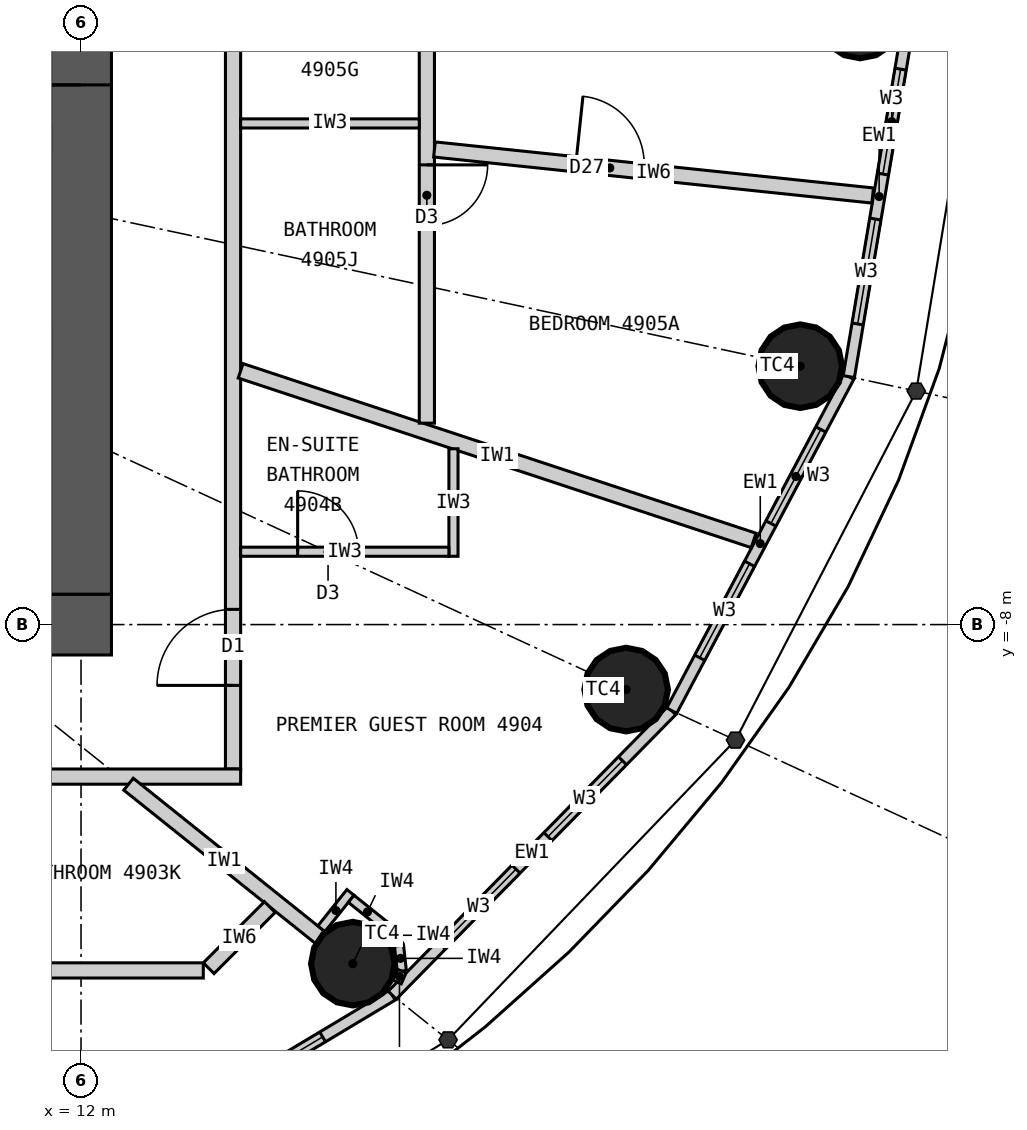
"""IFC4 building model, lengths in metres.
Left out: names, types, materials, properties, quantities, classifications, styles, units other than length and angle.
Written with IfcOpenShell. Run it as: python <this file> out.ifc"""

import sys

from ifc_helpers import new_model, si_unit, direction, frame, frame_2d, origin, origin_2d, place, context, subcontext, project, spatial, rectangle, circle, extrude, clip, halfspace, element, fill, save


model = new_model("IFC4")
c1 = context("Model", 3, precision=1e-05, world=origin(), true_north=direction((0.0, 1.0)))
c2 = subcontext(c1, "Body", "Model", "MODEL_VIEW")
j1 = project(units=[si_unit("LENGTHUNIT", "METRE"), si_unit("PLANEANGLEUNIT", "RADIAN")], contexts=[c1])
p1 = place(None, origin())
s1 = spatial("IfcSite", under=j1, at=p1, CompositionType="ELEMENT")
p2 = place(p1, origin())
s2 = spatial("IfcBuilding", under=s1, at=p2, CompositionType="ELEMENT")
p3 = place(p2, frame((0.0, 0.0, 183.0)))
s3 = spatial("IfcBuildingStorey", under=s2, at=p3, CompositionType="ELEMENT", Elevation=183.0)
for number, where, z_axis, x_axis in (
    (1, (22.25, 0.0, 0.0), (0.0, 0.0, 1.0), (1.0, 0.0, 0.0)),
    (2, (15.576, -12.461, 0.0), (0.0, 0.0, 1.0), (1.0, 0.0, 0.0)),
    (3, (19.172, -8.855, 0.0), (0.0, 0.0, 1.0), (1.0, 0.0, 0.0)),
    (4, (21.463, -4.601, 0.0), (0.0, 0.0, 1.0), (1.0, 0.0, 0.0)),
):
    element("IfcColumn", number, at=place(p3, frame(where, z_axis=z_axis, x_axis=x_axis)), inside=s3, PredefinedType="COLUMN", context=c2, shape_type="Clipping", body=[
        clip(extrude(circle(Radius=0.55, at=origin_2d()), origin(), (0.0, 0.0, 1.0), 3.3), halfspace(frame((0.0, 0.0, 2.25), z_axis=(0.0, 0.0, 1.0), x_axis=(1.0, 0.0, 0.0)), False)),
    ])
p4 = place(p3, frame((12.4, -8.0, 0.0), z_axis=(0.0, 0.0, 1.0), x_axis=(-1.0, 0.0, 0.0)))
e5 = element("IfcWall", 5, at=p4, inside=s3, PredefinedType="SHEAR", context=c2, shape_type="SweptSolid", body=[
    extrude(rectangle(XDim=24.8, YDim=0.8, at=frame_2d((12.4, 0.0))), origin(), (0.0, 0.0, 1.0), 3.3),
])
p5 = place(p4, frame((11.1, 0.0, 0.0)))
e6 = element("IfcOpeningElement", 6, at=p5, cuts=e5, PredefinedType="OPENING", context=c2, shape_type="SweptSolid", body=[
    extrude(rectangle(XDim=1.2, YDim=2.2, at=frame_2d((0.6, 1.1))), frame((0.0, 0.41, 0.0), z_axis=(0.0, -1.0, 0.0), x_axis=(1.0, 0.0, 0.0)), (0.0, 0.0, 1.0), 0.82),
])
p6 = place(p4, frame((18.7, 0.0, 0.0)))
e7 = element("IfcOpeningElement", 7, at=p6, cuts=e5, PredefinedType="OPENING", context=c2, shape_type="SweptSolid", body=[
    extrude(rectangle(XDim=0.9, YDim=2.2, at=frame_2d((0.45, 1.1))), frame((0.0, 0.41, 0.0), z_axis=(0.0, -1.0, 0.0), x_axis=(1.0, 0.0, 0.0)), (0.0, 0.0, 1.0), 0.82),
])
p7 = place(p3, frame((12.0, -7.6, 0.0), z_axis=(0.0, 0.0, 1.0), x_axis=(0.0, 1.0, 0.0)))
e8 = element("IfcWall", 8, at=p7, inside=s3, PredefinedType="SHEAR", context=c2, shape_type="SweptSolid", body=[
    extrude(rectangle(XDim=15.2, YDim=0.8, at=frame_2d((7.6, 0.0))), origin(), (0.0, 0.0, 1.0), 3.3),
])
p8 = place(p7, frame((6.7, 0.0, 0.0)))
e9 = element("IfcOpeningElement", 9, at=p8, cuts=e8, PredefinedType="OPENING", context=c2, shape_type="SweptSolid", body=[
    extrude(rectangle(XDim=1.8, YDim=2.2, at=frame_2d((0.9, 1.1))), frame((0.0, 0.41, 0.0), z_axis=(0.0, -1.0, 0.0), x_axis=(1.0, 0.0, 0.0)), (0.0, 0.0, 1.0), 0.82),
])
p9 = place(p3, frame((11.346, -15.722, 0.0), z_axis=(0.0, 0.0, 1.0), x_axis=(0.857695199231, 0.514158482587, 0.0)))
e10 = element("IfcWall", 10, at=p9, inside=s3, PredefinedType="ELEMENTEDWALL", context=c2, shape_type="SweptSolid", body=[
    extrude(rectangle(XDim=5.536, YDim=0.15, at=frame_2d((2.768, 0.0))), origin(), (0.0, 0.0, 1.0), 3.05),
])
p10 = place(p9, frame((1.068, 0.0, 0.9)))
e11 = element("IfcOpeningElement", 11, at=p10, cuts=e10, PredefinedType="OPENING", context=c2, shape_type="SweptSolid", body=[
    extrude(rectangle(XDim=1.4, YDim=1.9, at=frame_2d((0.7, 0.95))), frame((0.0, 0.085, 0.0), z_axis=(0.0, -1.0, 0.0), x_axis=(1.0, 0.0, 0.0)), (0.0, 0.0, 1.0), 0.17),
])
p11 = place(p9, frame((3.068, 0.0, 0.9)))
e12 = element("IfcOpeningElement", 12, at=p11, cuts=e10, PredefinedType="OPENING", context=c2, shape_type="SweptSolid", body=[
    extrude(rectangle(XDim=1.4, YDim=1.9, at=frame_2d((0.7, 0.95))), frame((0.0, 0.085, 0.0), z_axis=(0.0, -1.0, 0.0), x_axis=(1.0, 0.0, 0.0)), (0.0, 0.0, 1.0), 0.17),
])
p12 = place(p3, frame((16.095, -12.876, 0.0), z_axis=(0.0, 0.0, 1.0), x_axis=(0.700727467776, 0.71342905457, 0.0)))
e13 = element("IfcWall", 13, at=p12, inside=s3, PredefinedType="ELEMENTEDWALL", context=c2, shape_type="SweptSolid", body=[
    extrude(rectangle(XDim=5.247, YDim=0.15, at=frame_2d((2.624, 0.0))), origin(), (0.0, 0.0, 1.0), 3.05),
])
p13 = place(p12, frame((0.924, 0.0, 0.9)))
e14 = element("IfcOpeningElement", 14, at=p13, cuts=e13, PredefinedType="OPENING", context=c2, shape_type="SweptSolid", body=[
    extrude(rectangle(XDim=1.4, YDim=1.9, at=frame_2d((0.7, 0.95))), frame((0.0, 0.085, 0.0), z_axis=(0.0, -1.0, 0.0), x_axis=(1.0, 0.0, 0.0)), (0.0, 0.0, 1.0), 0.17),
])
p14 = place(p12, frame((2.924, 0.0, 0.9)))
e15 = element("IfcOpeningElement", 15, at=p14, cuts=e13, PredefinedType="OPENING", context=c2, shape_type="SweptSolid", body=[
    extrude(rectangle(XDim=1.4, YDim=1.9, at=frame_2d((0.7, 0.95))), frame((0.0, 0.085, 0.0), z_axis=(0.0, -1.0, 0.0), x_axis=(1.0, 0.0, 0.0)), (0.0, 0.0, 1.0), 0.17),
])
p15 = place(p3, frame((19.772, -9.132, 0.0), z_axis=(0.0, 0.0, 1.0), x_axis=(0.468428906714, 0.883501193748, 0.0)))
e16 = element("IfcWall", 16, at=p15, inside=s3, PredefinedType="ELEMENTEDWALL", context=c2, shape_type="SweptSolid", body=[
    extrude(rectangle(XDim=4.974, YDim=0.15, at=frame_2d((2.487, 0.0))), origin(), (0.0, 0.0, 1.0), 3.05),
])
p16 = place(p15, frame((0.787, 0.0, 0.9)))
e17 = element("IfcOpeningElement", 17, at=p16, cuts=e16, PredefinedType="OPENING", context=c2, shape_type="SweptSolid", body=[
    extrude(rectangle(XDim=1.4, YDim=1.9, at=frame_2d((0.7, 0.95))), frame((0.0, 0.085, 0.0), z_axis=(0.0, -1.0, 0.0), x_axis=(1.0, 0.0, 0.0)), (0.0, 0.0, 1.0), 0.17),
])
p17 = place(p15, frame((2.787, 0.0, 0.9)))
e18 = element("IfcOpeningElement", 18, at=p17, cuts=e16, PredefinedType="OPENING", context=c2, shape_type="SweptSolid", body=[
    extrude(rectangle(XDim=1.4, YDim=1.9, at=frame_2d((0.7, 0.95))), frame((0.0, 0.085, 0.0), z_axis=(0.0, -1.0, 0.0), x_axis=(1.0, 0.0, 0.0)), (0.0, 0.0, 1.0), 0.17),
])
p18 = place(p3, frame((22.102, -4.738, 0.0), z_axis=(0.0, 0.0, 1.0), x_axis=(0.166162111254, 0.986098449843, 0.0)))
e19 = element("IfcWall", 19, at=p18, inside=s3, PredefinedType="ELEMENTEDWALL", context=c2, shape_type="SweptSolid", body=[
    extrude(rectangle(XDim=4.805, YDim=0.15, at=frame_2d((2.402, 0.0))), origin(), (0.0, 0.0, 1.0), 3.05),
])
p19 = place(p18, frame((0.702, 0.0, 0.9)))
e20 = element("IfcOpeningElement", 20, at=p19, cuts=e19, PredefinedType="OPENING", context=c2, shape_type="SweptSolid", body=[
    extrude(rectangle(XDim=1.4, YDim=1.9, at=frame_2d((0.7, 0.95))), frame((0.0, 0.085, 0.0), z_axis=(0.0, -1.0, 0.0), x_axis=(1.0, 0.0, 0.0)), (0.0, 0.0, 1.0), 0.17),
])
p20 = place(p18, frame((2.702, 0.0, 0.9)))
e21 = element("IfcOpeningElement", 21, at=p20, cuts=e19, PredefinedType="OPENING", context=c2, shape_type="SweptSolid", body=[
    extrude(rectangle(XDim=1.4, YDim=1.9, at=frame_2d((0.7, 0.95))), frame((0.0, 0.085, 0.0), z_axis=(0.0, -1.0, 0.0), x_axis=(1.0, 0.0, 0.0)), (0.0, 0.0, 1.0), 0.17),
])
p21 = place(p3, frame((14.0, -9.9, 0.0), z_axis=(0.0, 0.0, 1.0), x_axis=(0.0, 1.0, 0.0)))
e22 = element("IfcWall", 22, at=p21, inside=s3, PredefinedType="PARTITIONING", context=c2, shape_type="SweptSolid", body=[
    extrude(rectangle(XDim=19.8, YDim=0.2, at=frame_2d((9.9, 0.0))), origin(), (0.0, 0.0, 1.0), 3.05),
])
p22 = place(p21, frame((1.1, 0.0, 0.0)))
e23 = element("IfcOpeningElement", 23, at=p22, cuts=e22, PredefinedType="OPENING", context=c2, shape_type="SweptSolid", body=[
    extrude(rectangle(XDim=1.0, YDim=2.2, at=frame_2d((0.5, 1.1))), frame((0.0, 0.11, 0.0), z_axis=(0.0, -1.0, 0.0), x_axis=(1.0, 0.0, 0.0)), (0.0, 0.0, 1.0), 0.22),
])
p23 = place(p21, frame((10.832, 0.0, 0.0)))
e24 = element("IfcOpeningElement", 24, at=p23, cuts=e22, PredefinedType="OPENING", context=c2, shape_type="SweptSolid", body=[
    extrude(rectangle(XDim=1.0, YDim=2.2, at=frame_2d((0.5, 1.1))), frame((0.0, 0.11, 0.0), z_axis=(0.0, -1.0, 0.0), x_axis=(1.0, 0.0, 0.0)), (0.0, 0.0, 1.0), 0.22),
])
p24 = place(p3, frame((14.1, -10.0, 0.0), z_axis=(0.0, 0.0, 1.0), x_axis=(-1.0, 0.0, 0.0)))
e25 = element("IfcWall", 25, at=p24, inside=s3, PredefinedType="PARTITIONING", context=c2, shape_type="SweptSolid", body=[
    extrude(rectangle(XDim=28.2, YDim=0.2, at=frame_2d((14.1, 0.0))), origin(), (0.0, 0.0, 1.0), 3.05),
])
p25 = place(p24, frame((23.165, 0.0, 0.0)))
e26 = element("IfcOpeningElement", 26, at=p25, cuts=e25, PredefinedType="OPENING", context=c2, shape_type="SweptSolid", body=[
    extrude(rectangle(XDim=1.0, YDim=2.2, at=frame_2d((0.5, 1.1))), frame((0.0, 0.11, 0.0), z_axis=(0.0, -1.0, 0.0), x_axis=(1.0, 0.0, 0.0)), (0.0, 0.0, 1.0), 0.22),
])
p26 = place(p24, frame((9.94, 0.0, 0.0)))
e27 = element("IfcOpeningElement", 27, at=p26, cuts=e25, PredefinedType="OPENING", context=c2, shape_type="SweptSolid", body=[
    extrude(rectangle(XDim=1.0, YDim=2.2, at=frame_2d((0.5, 1.1))), frame((0.0, 0.11, 0.0), z_axis=(0.0, -1.0, 0.0), x_axis=(1.0, 0.0, 0.0)), (0.0, 0.0, 1.0), 0.22),
])
p27 = place(p3, frame((12.625, -10.1, 0.0), z_axis=(0.0, 0.0, 1.0), x_axis=(0.780876185034, -0.624685827954, 0.0)))
e28 = element("IfcWall", 28, at=p27, inside=s3, PredefinedType="PARTITIONING", context=c2, shape_type="SweptSolid", body=[
    extrude(rectangle(XDim=3.229, YDim=0.2, at=frame_2d((1.615, 0.0))), origin(), (0.0, 0.0, 1.0), 2.25),
])
p28 = place(p3, frame((14.1, -4.661, 0.0), z_axis=(0.0, 0.0, 1.0), x_axis=(0.949453216399, -0.313908569285, 0.0)))
e29 = element("IfcWall", 29, at=p28, inside=s3, PredefinedType="PARTITIONING", context=c2, shape_type="SweptSolid", body=[
    extrude(rectangle(XDim=7.109, YDim=0.2, at=frame_2d((3.554, 0.0))), origin(), (0.0, 0.0, 1.0), 3.05),
])
p29 = place(p3, frame((-4.082, -12.55, 0.0), z_axis=(0.0, 0.0, 1.0), x_axis=(1.0, 0.0, 0.0)))
e30 = element("IfcWall", 30, at=p29, inside=s3, PredefinedType="PARTITIONING", context=c2, shape_type="SweptSolid", body=[
    extrude(rectangle(XDim=17.691, YDim=0.2, at=frame_2d((8.845, 0.0))), origin(), (0.0, 0.0, 1.0), 3.05),
])
p30 = place(p29, frame((2.449, 0.0, 0.0)))
e31 = element("IfcOpeningElement", 31, at=p30, cuts=e30, PredefinedType="OPENING", context=c2, shape_type="SweptSolid", body=[
    extrude(rectangle(XDim=0.8, YDim=2.1, at=frame_2d((0.4, 1.05))), frame((0.0, 0.11, 0.0), z_axis=(0.0, -1.0, 0.0), x_axis=(1.0, 0.0, 0.0)), (0.0, 0.0, 1.0), 0.22),
])
p31 = place(p29, frame((13.97, 0.0, 0.0)))
e32 = element("IfcOpeningElement", 32, at=p31, cuts=e30, PredefinedType="OPENING", context=c2, shape_type="SweptSolid", body=[
    extrude(rectangle(XDim=0.8, YDim=2.1, at=frame_2d((0.4, 1.05))), frame((0.0, 0.11, 0.0), z_axis=(0.0, -1.0, 0.0), x_axis=(1.0, 0.0, 0.0)), (0.0, 0.0, 1.0), 0.22),
])
p32 = place(p29, frame((8.42, 0.0, 0.0)))
e33 = element("IfcOpeningElement", 33, at=p32, cuts=e30, PredefinedType="OPENING", context=c2, shape_type="SweptSolid", body=[
    extrude(rectangle(XDim=0.9, YDim=2.1, at=frame_2d((0.45, 1.05))), frame((0.0, 0.11, 0.0), z_axis=(0.0, -1.0, 0.0), x_axis=(1.0, 0.0, 0.0)), (0.0, 0.0, 1.0), 0.22),
])
p33 = place(p3, frame((13.679, -12.521, 0.0), z_axis=(0.0, 0.0, 1.0), x_axis=(0.707106781187, 0.707106781187, 0.0)))
e34 = element("IfcWall", 34, at=p33, inside=s3, PredefinedType="PARTITIONING", context=c2, shape_type="SweptSolid", body=[
    extrude(rectangle(XDim=1.138, YDim=0.2, at=frame_2d((0.569, 0.0))), origin(), (0.0, 0.0, 1.0), 3.05),
])
p34 = place(p3, frame((16.9, -5.687, 0.0), z_axis=(0.0, 0.0, 1.0), x_axis=(0.0, -1.0, 0.0)))
e35 = element("IfcWall", 35, at=p34, inside=s3, PredefinedType="PARTITIONING", context=c2, shape_type="SweptSolid", body=[
    extrude(rectangle(XDim=1.414, YDim=0.12, at=frame_2d((0.707, 0.0))), origin(), (0.0, 0.0, 1.0), 3.05),
])
p35 = place(p3, frame((14.1, -7.042, 0.0), z_axis=(0.0, 0.0, 1.0), x_axis=(1.0, 0.0, 0.0)))
e36 = element("IfcWall", 36, at=p35, inside=s3, PredefinedType="PARTITIONING", context=c2, shape_type="SweptSolid", body=[
    extrude(rectangle(XDim=2.74, YDim=0.12, at=frame_2d((1.37, 0.0))), origin(), (0.0, 0.0, 1.0), 3.05),
])
p36 = place(p35, frame((0.75, 0.0, 0.0)))
e37 = element("IfcOpeningElement", 37, at=p36, cuts=e36, PredefinedType="OPENING", context=c2, shape_type="SweptSolid", body=[
    extrude(rectangle(XDim=0.8, YDim=2.1, at=frame_2d((0.4, 1.05))), frame((0.0, 0.07, 0.0), z_axis=(0.0, -1.0, 0.0), x_axis=(1.0, 0.0, 0.0)), (0.0, 0.0, 1.0), 0.14),
])
p37 = place(p3, frame((16.55, -5.35, 0.0), z_axis=(0.0, 0.0, 1.0), x_axis=(0.0, 1.0, 0.0)))
e38 = element("IfcWall", 38, at=p37, inside=s3, PredefinedType="PARTITIONING", context=c2, shape_type="SweptSolid", body=[
    extrude(rectangle(XDim=14.959, YDim=0.2, at=frame_2d((7.479, 0.0))), origin(), (0.0, 0.0, 1.0), 3.05),
])
p38 = place(p37, frame((2.598, 0.0, 0.0)))
e39 = element("IfcOpeningElement", 39, at=p38, cuts=e38, PredefinedType="OPENING", context=c2, shape_type="SweptSolid", body=[
    extrude(rectangle(XDim=0.8, YDim=2.1, at=frame_2d((0.4, 1.05))), frame((0.0, 0.11, 0.0), z_axis=(0.0, -1.0, 0.0), x_axis=(1.0, 0.0, 0.0)), (0.0, 0.0, 1.0), 0.22),
])
p39 = place(p37, frame((11.27, 0.0, 0.0)))
e40 = element("IfcOpeningElement", 40, at=p39, cuts=e38, PredefinedType="OPENING", context=c2, shape_type="SweptSolid", body=[
    extrude(rectangle(XDim=0.8, YDim=2.1, at=frame_2d((0.4, 1.05))), frame((0.0, 0.11, 0.0), z_axis=(0.0, -1.0, 0.0), x_axis=(1.0, 0.0, 0.0)), (0.0, 0.0, 1.0), 0.22),
])
p40 = place(p37, frame((6.757, 0.0, 0.0)))
e41 = element("IfcOpeningElement", 41, at=p40, cuts=e38, PredefinedType="OPENING", context=c2, shape_type="SweptSolid", body=[
    extrude(rectangle(XDim=0.9, YDim=2.1, at=frame_2d((0.45, 1.05))), frame((0.0, 0.11, 0.0), z_axis=(0.0, -1.0, 0.0), x_axis=(1.0, 0.0, 0.0)), (0.0, 0.0, 1.0), 0.22),
])
p41 = place(p3, frame((16.65, -1.75, 0.0), z_axis=(0.0, 0.0, 1.0), x_axis=(0.994527351734, -0.104476536379, 0.0)))
e42 = element("IfcWall", 42, at=p41, inside=s3, PredefinedType="PARTITIONING", context=c2, shape_type="SweptSolid", body=[
    extrude(rectangle(XDim=5.798, YDim=0.2, at=frame_2d((2.899, 0.0))), origin(), (0.0, 0.0, 1.0), 3.05),
])
p42 = place(p41, frame((1.87, 0.0, 0.0)))
e43 = element("IfcOpeningElement", 43, at=p42, cuts=e42, PredefinedType="OPENING", context=c2, shape_type="SweptSolid", body=[
    extrude(rectangle(XDim=0.9, YDim=2.1, at=frame_2d((0.45, 1.05))), frame((0.0, 0.11, 0.0), z_axis=(0.0, -1.0, 0.0), x_axis=(1.0, 0.0, 0.0)), (0.0, 0.0, 1.0), 0.22),
])
p43 = place(p3, frame((14.1, -1.407, 0.0), z_axis=(0.0, 0.0, 1.0), x_axis=(1.0, 0.0, 0.0)))
e44 = element("IfcWall", 44, at=p43, inside=s3, PredefinedType="PARTITIONING", context=c2, shape_type="SweptSolid", body=[
    extrude(rectangle(XDim=2.35, YDim=0.12, at=frame_2d((1.175, 0.0))), origin(), (0.0, 0.0, 1.0), 2.3),
])
p44 = place(p3, frame((15.162, -12.002, 0.0), z_axis=(0.0, 0.0, 1.0), x_axis=(0.624597762427, 0.780946627607, 0.0)))
e45 = element("IfcWall", 45, at=p44, inside=s3, PredefinedType="PARTITIONING", context=c2, shape_type="SweptSolid", body=[
    extrude(rectangle(XDim=0.612, YDim=0.12, at=frame_2d((0.306, 0.0))), origin(), (0.0, 0.0, 1.0), 3.05),
])
p45 = place(p3, frame((15.554, -11.608, 0.0), z_axis=(0.0, 0.0, 1.0), x_axis=(0.780695577787, -0.624911525597, 0.0)))
e46 = element("IfcWall", 46, at=p45, inside=s3, PredefinedType="PARTITIONING", context=c2, shape_type="SweptSolid", body=[
    extrude(rectangle(XDim=0.55, YDim=0.12, at=frame_2d((0.275, 0.0))), origin(), (0.0, 0.0, 1.0), 3.05),
])
p46 = place(p3, frame((15.984, -11.952, 0.0), z_axis=(0.0, 0.0, 1.0), x_axis=(0.592335221171, -0.805691619517, 0.0)))
e47 = element("IfcWall", 47, at=p46, inside=s3, PredefinedType="PARTITIONING", context=c2, shape_type="SweptSolid", body=[
    extrude(rectangle(XDim=0.338, YDim=0.12, at=frame_2d((0.169, 0.0))), origin(), (0.0, 0.0, 1.0), 3.05),
])
p47 = place(p3, frame((16.184, -12.224, 0.0), z_axis=(0.0, 0.0, 1.0), x_axis=(0.110669692975, -0.993857242795, 0.0)))
e48 = element("IfcWall", 48, at=p47, inside=s3, PredefinedType="PARTITIONING", context=c2, shape_type="SweptSolid", body=[
    extrude(rectangle(XDim=0.337, YDim=0.12, at=frame_2d((0.169, 0.0))), origin(), (0.0, 0.0, 1.0), 3.05),
])
p48 = place(p3, frame((16.221, -12.559, 0.0), z_axis=(0.0, 0.0, 1.0), x_axis=(-0.401064416249, -0.916049853457, 0.0)))
e49 = element("IfcWall", 49, at=p48, inside=s3, PredefinedType="PARTITIONING", context=c2, shape_type="SweptSolid", body=[
    extrude(rectangle(XDim=0.156, YDim=0.12, at=frame_2d((0.078, 0.0))), origin(), (0.0, 0.0, 1.0), 3.05),
])
p49 = place(p11, origin())
e50 = element("IfcWindow", 50, at=p49, inside=s3, PartitioningType="SINGLE_PANEL", PredefinedType="WINDOW", context=c2, shape_type="SweptSolid", body=[
    extrude(rectangle(XDim=1.4, YDim=1.9, at=frame_2d((0.7, 0.95))), frame((0.0, 0.03, 0.0), z_axis=(0.0, -1.0, 0.0), x_axis=(1.0, 0.0, 0.0)), (0.0, 0.0, 1.0), 0.06),
])
fill(e12, e50)
p50 = place(p13, origin())
e51 = element("IfcWindow", 51, at=p50, inside=s3, PartitioningType="SINGLE_PANEL", PredefinedType="WINDOW", context=c2, shape_type="SweptSolid", body=[
    extrude(rectangle(XDim=1.4, YDim=1.9, at=frame_2d((0.7, 0.95))), frame((0.0, 0.03, 0.0), z_axis=(0.0, -1.0, 0.0), x_axis=(1.0, 0.0, 0.0)), (0.0, 0.0, 1.0), 0.06),
])
fill(e14, e51)
p51 = place(p14, origin())
e52 = element("IfcWindow", 52, at=p51, inside=s3, PartitioningType="SINGLE_PANEL", PredefinedType="WINDOW", context=c2, shape_type="SweptSolid", body=[
    extrude(rectangle(XDim=1.4, YDim=1.9, at=frame_2d((0.7, 0.95))), frame((0.0, 0.03, 0.0), z_axis=(0.0, -1.0, 0.0), x_axis=(1.0, 0.0, 0.0)), (0.0, 0.0, 1.0), 0.06),
])
fill(e15, e52)
p52 = place(p16, origin())
e53 = element("IfcWindow", 53, at=p52, inside=s3, PartitioningType="SINGLE_PANEL", PredefinedType="WINDOW", context=c2, shape_type="SweptSolid", body=[
    extrude(rectangle(XDim=1.4, YDim=1.9, at=frame_2d((0.7, 0.95))), frame((0.0, 0.03, 0.0), z_axis=(0.0, -1.0, 0.0), x_axis=(1.0, 0.0, 0.0)), (0.0, 0.0, 1.0), 0.06),
])
fill(e17, e53)
p53 = place(p17, origin())
e54 = element("IfcWindow", 54, at=p53, inside=s3, PartitioningType="SINGLE_PANEL", PredefinedType="WINDOW", context=c2, shape_type="SweptSolid", body=[
    extrude(rectangle(XDim=1.4, YDim=1.9, at=frame_2d((0.7, 0.95))), frame((0.0, 0.03, 0.0), z_axis=(0.0, -1.0, 0.0), x_axis=(1.0, 0.0, 0.0)), (0.0, 0.0, 1.0), 0.06),
])
fill(e18, e54)
p54 = place(p19, origin())
e55 = element("IfcWindow", 55, at=p54, inside=s3, PartitioningType="SINGLE_PANEL", PredefinedType="WINDOW", context=c2, shape_type="SweptSolid", body=[
    extrude(rectangle(XDim=1.4, YDim=1.9, at=frame_2d((0.7, 0.95))), frame((0.0, 0.03, 0.0), z_axis=(0.0, -1.0, 0.0), x_axis=(1.0, 0.0, 0.0)), (0.0, 0.0, 1.0), 0.06),
])
fill(e20, e55)
p55 = place(p20, origin())
e56 = element("IfcWindow", 56, at=p55, inside=s3, PartitioningType="SINGLE_PANEL", PredefinedType="WINDOW", context=c2, shape_type="SweptSolid", body=[
    extrude(rectangle(XDim=1.4, YDim=1.9, at=frame_2d((0.7, 0.95))), frame((0.0, 0.03, 0.0), z_axis=(0.0, -1.0, 0.0), x_axis=(1.0, 0.0, 0.0)), (0.0, 0.0, 1.0), 0.06),
])
fill(e21, e56)
p56 = place(p36, origin())
e57 = element("IfcDoor", 57, at=p56, inside=s3, OperationType="SINGLE_SWING_LEFT", PredefinedType="DOOR", context=c2, shape_type="SweptSolid", body=[
    extrude(rectangle(XDim=0.8, YDim=2.1, at=frame_2d((0.4, 1.05))), frame((0.0, 0.025, 0.0), z_axis=(0.0, -1.0, 0.0), x_axis=(1.0, 0.0, 0.0)), (0.0, 0.0, 1.0), 0.05),
])
fill(e37, e57)
p57 = place(p22, origin())
e58 = element("IfcDoor", 58, at=p57, inside=s3, OperationType="SINGLE_SWING_LEFT", PredefinedType="DOOR", context=c2, shape_type="SweptSolid", body=[
    extrude(rectangle(XDim=1.0, YDim=2.2, at=frame_2d((0.5, 1.1))), frame((0.0, 0.025, 0.0), z_axis=(0.0, -1.0, 0.0), x_axis=(1.0, 0.0, 0.0)), (0.0, 0.0, 1.0), 0.05),
])
fill(e23, e58)
p58 = place(p38, origin())
e59 = element("IfcDoor", 59, at=p58, inside=s3, OperationType="SINGLE_SWING_RIGHT", PredefinedType="DOOR", context=c2, shape_type="SweptSolid", body=[
    extrude(rectangle(XDim=0.8, YDim=2.1, at=frame_2d((0.4, 1.05))), frame((0.0, 0.025, 0.0), z_axis=(0.0, -1.0, 0.0), x_axis=(1.0, 0.0, 0.0)), (0.0, 0.0, 1.0), 0.05),
])
fill(e39, e59)
p59 = place(p42, origin())
e60 = element("IfcDoor", 60, at=p59, inside=s3, OperationType="SINGLE_SWING_LEFT", PredefinedType="DOOR", context=c2, shape_type="SweptSolid", body=[
    extrude(rectangle(XDim=0.9, YDim=2.1, at=frame_2d((0.45, 1.05))), frame((0.0, 0.025, 0.0), z_axis=(0.0, -1.0, 0.0), x_axis=(1.0, 0.0, 0.0)), (0.0, 0.0, 1.0), 0.05),
])
fill(e43, e60)
p60 = place(p8, origin())
e61 = element("IfcDoor", 61, at=p60, inside=s3, OperationType="DOUBLE_DOOR_DOUBLE_SWING", PredefinedType="DOOR", context=c2, shape_type="SweptSolid", body=[
    extrude(rectangle(XDim=1.8, YDim=2.2, at=frame_2d((0.9, 1.1))), frame((0.0, 0.025, 0.0), z_axis=(0.0, -1.0, 0.0), x_axis=(1.0, 0.0, 0.0)), (0.0, 0.0, 1.0), 0.05),
])
fill(e9, e61)
save(model, sys.argv[1])
